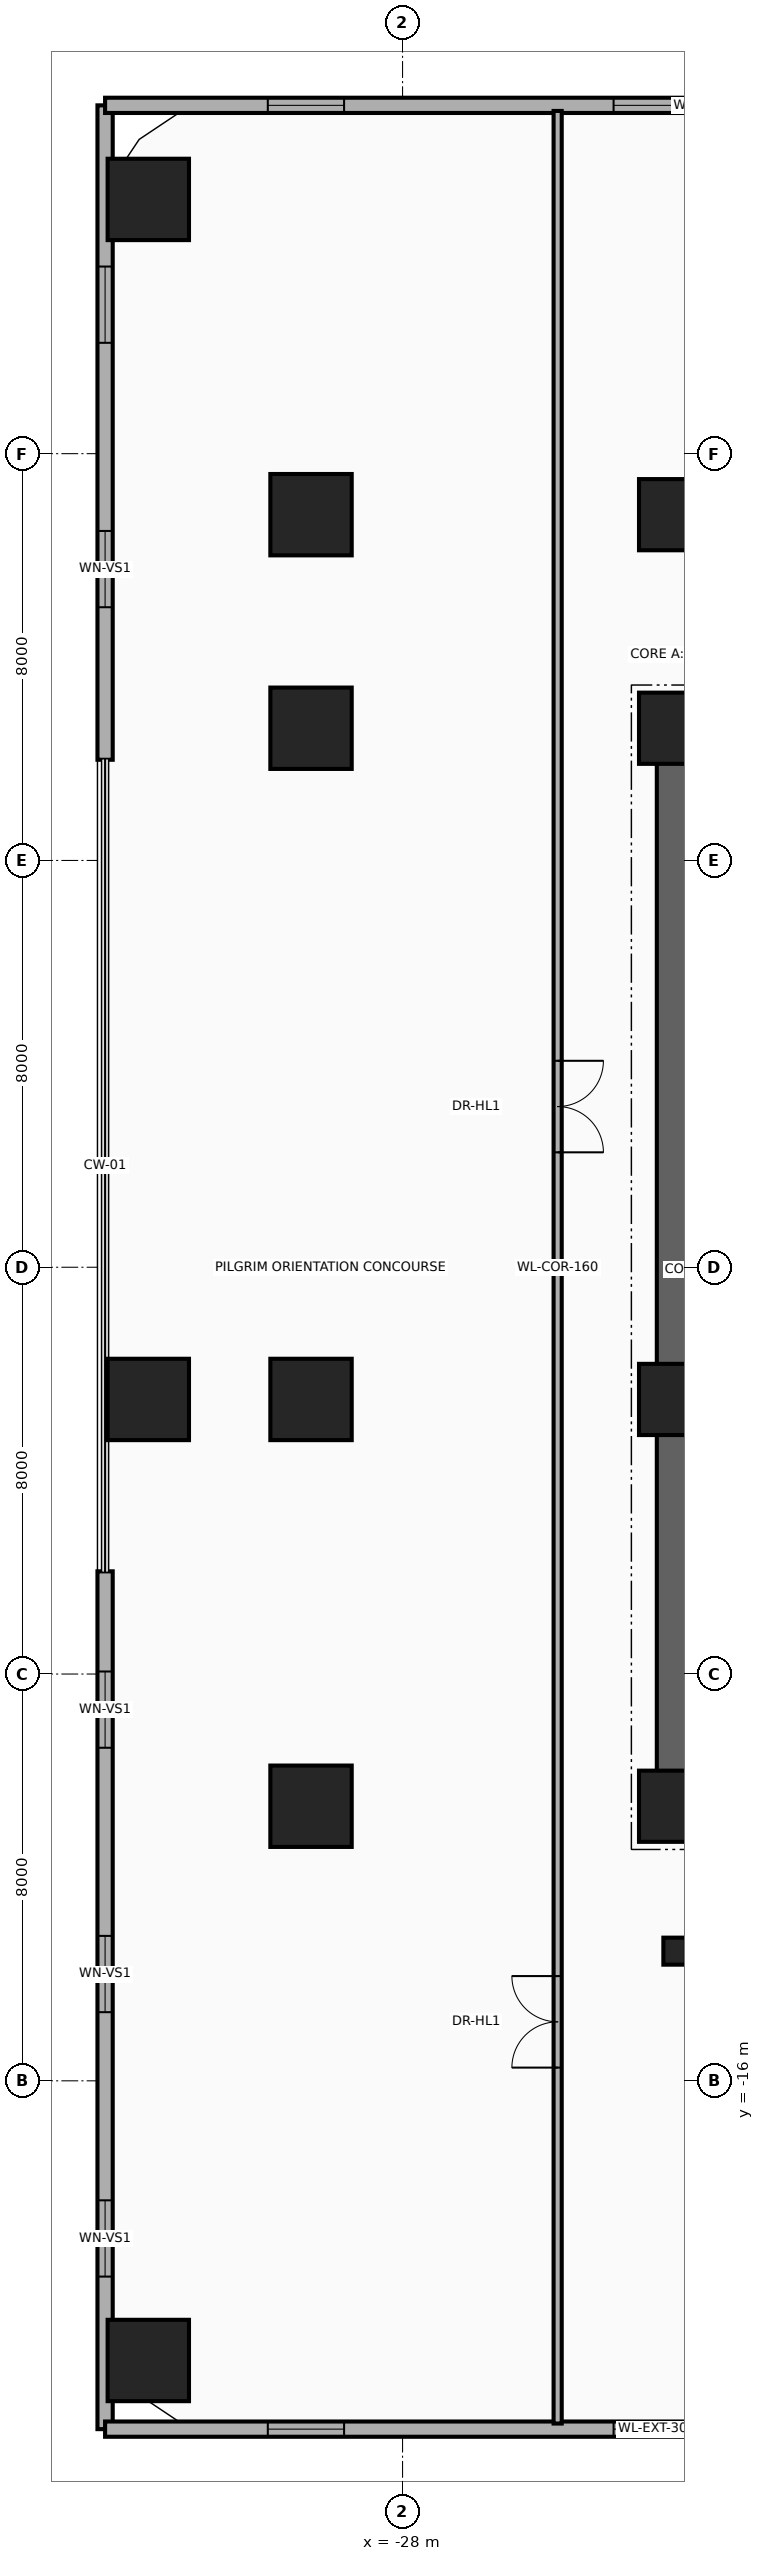
"""IFC4 building model, lengths in metres.
Left out: names, types, materials, properties, quantities, classifications, styles, units other than length and angle.
Written with IfcOpenShell. Run it as: python <this file> out.ifc"""

import sys

from ifc_helpers import new_model, si_unit, direction, frame, frame_2d, origin, origin_2d, place, context, subcontext, project, spatial, rectangle, i_section, extrude, source, transform, mapped, element, fill, save


model = new_model("IFC4")
c1 = context("Model", 3, precision=1e-05, world=origin(), true_north=direction((0.0, 1.0)))
c2 = subcontext(c1, "Body", "Model", "MODEL_VIEW")
j1 = project(units=[si_unit("LENGTHUNIT", "METRE"), si_unit("PLANEANGLEUNIT", "RADIAN")], contexts=[c1])
p1 = place(None, origin())
s1 = spatial("IfcSite", under=j1, at=p1, CompositionType="ELEMENT")
p2 = place(p1, origin())
s2 = spatial("IfcBuilding", under=s1, at=p2, CompositionType="ELEMENT")
p3 = place(p2, frame((0.0, 0.0, 5.2)))
s3 = spatial("IfcBuildingStorey", under=s2, at=p3, CompositionType="ELEMENT", Elevation=5.2)
p4 = place(p3, frame((-22.65, -11.15, 0.0), z_axis=(0.0, 0.0, 1.0), x_axis=(0.0, 1.0, 0.0)))
e1 = element("IfcWall", 1, at=p4, inside=s3, PredefinedType="SHEAR", context=c2, shape_type="SweptSolid", body=[
    extrude(rectangle(XDim=22.3, YDim=0.7, at=frame_2d((11.15, 0.0))), origin(), (0.0, 0.0, 1.0), 4.92),
])
for number, where, z_axis, x_axis in (
    (2, (-22.65, 10.8, 0.0), (0.0, 0.0, 1.0), (1.0, 0.0, 0.0)),
    (3, (-22.65, -10.8, 0.0), (0.0, 0.0, 1.0), (1.0, 0.0, 0.0)),
):
    element("IfcWall", number, at=place(p3, frame(where, z_axis=z_axis, x_axis=x_axis)), inside=s3, PredefinedType="SHEAR", context=c2, shape_type="SweptSolid", body=[
        extrude(rectangle(XDim=10.25, YDim=0.7, at=frame_2d((5.125, 0.0))), origin(), (0.0, 0.0, 1.0), 4.92),
    ])
m1 = source(origin(), c2, "Body", "SweptSolid", [
    extrude(rectangle(XDim=1.6, YDim=1.6, at=origin_2d()), origin(), (0.0, 0.0, 1.0), 5.2),
])
p5 = place(p3, frame((-29.8, -10.6, 0.0), z_axis=(0.0, 0.0, 1.0), x_axis=(1.0, 0.0, 0.0)))
e4 = element("IfcColumn", 4, at=p5, inside=s3, PredefinedType="COLUMN", context=c2, shape_type="MappedRepresentation", body=[
    mapped(m1, transform((0.0, 0.0, 0.0), x_axis=(1.0, 0.0, 0.0), y_axis=(0.0, 1.0, 0.0), z_axis=(0.0, 0.0, 1.0), scale=1.0)),
])
m2 = source(origin(), c2, "Body", "SweptSolid", [
    extrude(rectangle(XDim=1.4, YDim=1.4, at=origin_2d()), origin(), (0.0, 0.0, 1.0), 5.2),
])
p6 = place(p3, frame((-22.65, -10.6, 0.0), z_axis=(0.0, 0.0, 1.0), x_axis=(1.0, 0.0, 0.0)))
e5 = element("IfcColumn", 5, at=p6, inside=s3, PredefinedType="COLUMN", context=c2, shape_type="MappedRepresentation", body=[
    mapped(m2, transform((0.0, 0.0, 0.0), x_axis=(1.0, 0.0, 0.0), y_axis=(0.0, 1.0, 0.0), z_axis=(0.0, 0.0, 1.0), scale=1.0)),
])
p7 = place(p3, frame((-29.8, -2.6, 0.0), z_axis=(0.0, 0.0, 1.0), x_axis=(1.0, 0.0, 0.0)))
e6 = element("IfcColumn", 6, at=p7, inside=s3, PredefinedType="COLUMN", context=c2, shape_type="MappedRepresentation", body=[
    mapped(m1, transform((0.0, 0.0, 0.0), x_axis=(1.0, 0.0, 0.0), y_axis=(0.0, 1.0, 0.0), z_axis=(0.0, 0.0, 1.0), scale=1.0)),
])
p8 = place(p3, frame((-22.65, -2.6, 0.0), z_axis=(0.0, 0.0, 1.0), x_axis=(1.0, 0.0, 0.0)))
e7 = element("IfcColumn", 7, at=p8, inside=s3, PredefinedType="COLUMN", context=c2, shape_type="MappedRepresentation", body=[
    mapped(m2, transform((0.0, 0.0, 0.0), x_axis=(1.0, 0.0, 0.0), y_axis=(0.0, 1.0, 0.0), z_axis=(0.0, 0.0, 1.0), scale=1.0)),
])
p9 = place(p3, frame((-29.8, 10.6, 0.0), z_axis=(0.0, 0.0, 1.0), x_axis=(1.0, 0.0, 0.0)))
e8 = element("IfcColumn", 8, at=p9, inside=s3, PredefinedType="COLUMN", context=c2, shape_type="MappedRepresentation", body=[
    mapped(m1, transform((0.0, 0.0, 0.0), x_axis=(1.0, 0.0, 0.0), y_axis=(0.0, 1.0, 0.0), z_axis=(0.0, 0.0, 1.0), scale=1.0)),
])
p10 = place(p3, frame((-22.65, 10.6, 0.0), z_axis=(0.0, 0.0, 1.0), x_axis=(1.0, 0.0, 0.0)))
e9 = element("IfcColumn", 9, at=p10, inside=s3, PredefinedType="COLUMN", context=c2, shape_type="MappedRepresentation", body=[
    mapped(m2, transform((0.0, 0.0, 0.0), x_axis=(1.0, 0.0, 0.0), y_axis=(0.0, 1.0, 0.0), z_axis=(0.0, 0.0, 1.0), scale=1.0)),
])
p11 = place(p3, frame((-29.8, 14.8, 0.0), z_axis=(0.0, 0.0, 1.0), x_axis=(1.0, 0.0, 0.0)))
e10 = element("IfcColumn", 10, at=p11, inside=s3, PredefinedType="COLUMN", context=c2, shape_type="MappedRepresentation", body=[
    mapped(m1, transform((0.0, 0.0, 0.0), x_axis=(1.0, 0.0, 0.0), y_axis=(0.0, 1.0, 0.0), z_axis=(0.0, 0.0, 1.0), scale=1.0)),
])
p12 = place(p3, frame((-22.65, 14.8, 0.0), z_axis=(0.0, 0.0, 1.0), x_axis=(1.0, 0.0, 0.0)))
e11 = element("IfcColumn", 11, at=p12, inside=s3, PredefinedType="COLUMN", context=c2, shape_type="MappedRepresentation", body=[
    mapped(m2, transform((0.0, 0.0, 0.0), x_axis=(1.0, 0.0, 0.0), y_axis=(0.0, 1.0, 0.0), z_axis=(0.0, 0.0, 1.0), scale=1.0)),
])
m3 = source(origin(), c2, "Body", "SweptSolid", [
    extrude(i_section(OverallWidth=0.442, OverallDepth=0.531, WebThickness=0.066, FlangeThickness=0.106, at=origin_2d()), origin(), (0.0, 0.0, 1.0), 5.2),
])
p13 = place(p3, frame((-22.65, -13.45, 0.0), z_axis=(0.0, 0.0, 1.0), x_axis=(1.0, 0.0, 0.0)))
e12 = element("IfcColumn", 12, at=p13, inside=s3, PredefinedType="COLUMN", context=c2, shape_type="MappedRepresentation", body=[
    mapped(m3, transform((0.0, 0.0, 0.0), x_axis=(1.0, 0.0, 0.0), y_axis=(0.0, 1.0, 0.0), z_axis=(0.0, 0.0, 1.0), scale=1.0)),
])
for number, where, z_axis, x_axis in (
    (13, (-33.0, -21.5, 0.0), (0.0, 0.0, 1.0), (1.0, 0.0, 0.0)),
    (14, (-33.0, -2.6, 0.0), (0.0, 0.0, 1.0), (1.0, 0.0, 0.0)),
    (15, (-33.0, 21.0, 0.0), (0.0, 0.0, 1.0), (1.0, 0.0, 0.0)),
):
    element("IfcColumn", number, at=place(p3, frame(where, z_axis=z_axis, x_axis=x_axis)), inside=s3, PredefinedType="COLUMN", context=c2, shape_type="MappedRepresentation", body=[
        mapped(m1, transform((0.0, 0.0, 0.0), x_axis=(1.0, 0.0, 0.0), y_axis=(0.0, 1.0, 0.0), z_axis=(0.0, 0.0, 1.0), scale=1.0)),
    ])
p14 = place(p3, frame((-33.85, -22.85, 0.0), z_axis=(0.0, 0.0, 1.0), x_axis=(0.0, 1.0, 0.0)))
e16 = element("IfcWall", 16, at=p14, inside=s3, PredefinedType="SOLIDWALL", context=c2, shape_type="SweptSolid", body=[
    extrude(rectangle(XDim=16.87, YDim=0.3, at=frame_2d((8.435, 0.0))), origin(), (0.0, 0.0, 1.0), 4.92),
])
p15 = place(p14, frame((3.0, 0.0, 0.9)))
e17 = element("IfcOpeningElement", 17, at=p15, cuts=e16, PredefinedType="OPENING", context=c2, shape_type="SweptSolid", body=[
    extrude(rectangle(XDim=1.5, YDim=1.75, at=frame_2d((0.75, 0.875))), frame((0.0, 0.165, 0.0), z_axis=(0.0, -1.0, 0.0), x_axis=(1.0, 0.0, 0.0)), (0.0, 0.0, 1.0), 0.33),
])
p16 = place(p14, frame((8.2, 0.0, 0.9)))
e18 = element("IfcOpeningElement", 18, at=p16, cuts=e16, PredefinedType="OPENING", context=c2, shape_type="SweptSolid", body=[
    extrude(rectangle(XDim=1.5, YDim=1.75, at=frame_2d((0.75, 0.875))), frame((0.0, 0.165, 0.0), z_axis=(0.0, -1.0, 0.0), x_axis=(1.0, 0.0, 0.0)), (0.0, 0.0, 1.0), 0.33),
])
p17 = place(p14, frame((13.4, 0.0, 0.9)))
e19 = element("IfcOpeningElement", 19, at=p17, cuts=e16, PredefinedType="OPENING", context=c2, shape_type="SweptSolid", body=[
    extrude(rectangle(XDim=1.5, YDim=1.75, at=frame_2d((0.75, 0.875))), frame((0.0, 0.165, 0.0), z_axis=(0.0, -1.0, 0.0), x_axis=(1.0, 0.0, 0.0)), (0.0, 0.0, 1.0), 0.33),
])
p18 = place(p3, frame((-33.85, 9.98, 0.0), z_axis=(0.0, 0.0, 1.0), x_axis=(0.0, 1.0, 0.0)))
e20 = element("IfcWall", 20, at=p18, inside=s3, PredefinedType="SOLIDWALL", context=c2, shape_type="SweptSolid", body=[
    extrude(rectangle(XDim=12.87, YDim=0.3, at=frame_2d((6.435, 0.0))), origin(), (0.0, 0.0, 1.0), 4.92),
])
p19 = place(p18, frame((3.0, 0.0, 0.9)))
e21 = element("IfcOpeningElement", 21, at=p19, cuts=e20, PredefinedType="OPENING", context=c2, shape_type="SweptSolid", body=[
    extrude(rectangle(XDim=1.5, YDim=1.75, at=frame_2d((0.75, 0.875))), frame((0.0, 0.165, 0.0), z_axis=(0.0, -1.0, 0.0), x_axis=(1.0, 0.0, 0.0)), (0.0, 0.0, 1.0), 0.33),
])
p20 = place(p18, frame((8.2, 0.0, 0.9)))
e22 = element("IfcOpeningElement", 22, at=p20, cuts=e20, PredefinedType="OPENING", context=c2, shape_type="SweptSolid", body=[
    extrude(rectangle(XDim=1.5, YDim=1.75, at=frame_2d((0.75, 0.875))), frame((0.0, 0.165, 0.0), z_axis=(0.0, -1.0, 0.0), x_axis=(1.0, 0.0, 0.0)), (0.0, 0.0, 1.0), 0.33),
])
p21 = place(p3, frame((-33.85, -22.85, 0.0), z_axis=(0.0, 0.0, 1.0), x_axis=(1.0, 0.0, 0.0)))
e23 = element("IfcWall", 23, at=p21, inside=s3, PredefinedType="SOLIDWALL", context=c2, shape_type="SweptSolid", body=[
    extrude(rectangle(XDim=21.7, YDim=0.3, at=frame_2d((10.85, 0.0))), origin(), (0.0, 0.0, 1.0), 4.92),
])
p22 = place(p21, frame((3.2, 0.0, 0.9)))
e24 = element("IfcOpeningElement", 24, at=p22, cuts=e23, PredefinedType="OPENING", context=c2, shape_type="SweptSolid", body=[
    extrude(rectangle(XDim=1.5, YDim=1.75, at=frame_2d((0.75, 0.875))), frame((0.0, 0.165, 0.0), z_axis=(0.0, -1.0, 0.0), x_axis=(1.0, 0.0, 0.0)), (0.0, 0.0, 1.0), 0.33),
])
p23 = place(p21, frame((10.0, 0.0, 0.9)))
e25 = element("IfcOpeningElement", 25, at=p23, cuts=e23, PredefinedType="OPENING", context=c2, shape_type="SweptSolid", body=[
    extrude(rectangle(XDim=1.5, YDim=1.75, at=frame_2d((0.75, 0.875))), frame((0.0, 0.165, 0.0), z_axis=(0.0, -1.0, 0.0), x_axis=(1.0, 0.0, 0.0)), (0.0, 0.0, 1.0), 0.33),
])
p24 = place(p21, frame((17.8, 0.0, 0.9)))
e26 = element("IfcOpeningElement", 26, at=p24, cuts=e23, PredefinedType="OPENING", context=c2, shape_type="SweptSolid", body=[
    extrude(rectangle(XDim=1.5, YDim=1.75, at=frame_2d((0.75, 0.875))), frame((0.0, 0.165, 0.0), z_axis=(0.0, -1.0, 0.0), x_axis=(1.0, 0.0, 0.0)), (0.0, 0.0, 1.0), 0.33),
])
p25 = place(p3, frame((-33.85, 22.85, 0.0), z_axis=(0.0, 0.0, 1.0), x_axis=(1.0, 0.0, 0.0)))
e27 = element("IfcWall", 27, at=p25, inside=s3, PredefinedType="SOLIDWALL", context=c2, shape_type="SweptSolid", body=[
    extrude(rectangle(XDim=23.87, YDim=0.3, at=frame_2d((11.935, 0.0))), origin(), (0.0, 0.0, 1.0), 4.92),
])
p26 = place(p25, frame((3.2, 0.0, 0.9)))
e28 = element("IfcOpeningElement", 28, at=p26, cuts=e27, PredefinedType="OPENING", context=c2, shape_type="SweptSolid", body=[
    extrude(rectangle(XDim=1.5, YDim=1.75, at=frame_2d((0.75, 0.875))), frame((0.0, 0.165, 0.0), z_axis=(0.0, -1.0, 0.0), x_axis=(1.0, 0.0, 0.0)), (0.0, 0.0, 1.0), 0.33),
])
p27 = place(p25, frame((10.0, 0.0, 0.9)))
e29 = element("IfcOpeningElement", 29, at=p27, cuts=e27, PredefinedType="OPENING", context=c2, shape_type="SweptSolid", body=[
    extrude(rectangle(XDim=1.5, YDim=1.75, at=frame_2d((0.75, 0.875))), frame((0.0, 0.165, 0.0), z_axis=(0.0, -1.0, 0.0), x_axis=(1.0, 0.0, 0.0)), (0.0, 0.0, 1.0), 0.33),
])
p28 = place(p25, frame((17.8, 0.0, 0.9)))
e30 = element("IfcOpeningElement", 30, at=p28, cuts=e27, PredefinedType="OPENING", context=c2, shape_type="SweptSolid", body=[
    extrude(rectangle(XDim=1.5, YDim=1.75, at=frame_2d((0.75, 0.875))), frame((0.0, 0.165, 0.0), z_axis=(0.0, -1.0, 0.0), x_axis=(1.0, 0.0, 0.0)), (0.0, 0.0, 1.0), 0.33),
])
p29 = place(p3, frame((-24.95, -22.74, 0.0), z_axis=(0.0, 0.0, 1.0), x_axis=(0.0, 1.0, 0.0)))
e31 = element("IfcWall", 31, at=p29, inside=s3, PredefinedType="PARTITIONING", context=c2, shape_type="SweptSolid", body=[
    extrude(rectangle(XDim=45.48, YDim=0.16, at=frame_2d((22.74, 0.0))), origin(), (0.0, 0.0, 1.0), 3.957),
])
p30 = place(p29, frame((7.0, 0.0, 0.0)))
e32 = element("IfcOpeningElement", 32, at=p30, cuts=e31, PredefinedType="OPENING", context=c2, shape_type="SweptSolid", body=[
    extrude(rectangle(XDim=1.8, YDim=2.15, at=frame_2d((0.9, 1.075))), frame((0.0, 0.095, 0.0), z_axis=(0.0, -1.0, 0.0), x_axis=(1.0, 0.0, 0.0)), (0.0, 0.0, 1.0), 0.19),
])
p31 = place(p29, frame((25.0, 0.0, 0.0)))
e33 = element("IfcOpeningElement", 33, at=p31, cuts=e31, PredefinedType="OPENING", context=c2, shape_type="SweptSolid", body=[
    extrude(rectangle(XDim=1.8, YDim=2.15, at=frame_2d((0.9, 1.075))), frame((0.0, 0.095, 0.0), z_axis=(0.0, -1.0, 0.0), x_axis=(1.0, 0.0, 0.0)), (0.0, 0.0, 1.0), 0.19),
])
p32 = place(p15, origin())
e34 = element("IfcWindow", 34, at=p32, inside=s3, PartitioningType="SINGLE_PANEL", PredefinedType="WINDOW", context=c2, shape_type="SweptSolid", body=[
    extrude(rectangle(XDim=1.5, YDim=1.75, at=frame_2d((0.75, 0.875))), frame((0.0, 0.03, 0.0), z_axis=(0.0, -1.0, 0.0), x_axis=(1.0, 0.0, 0.0)), (0.0, 0.0, 1.0), 0.06),
])
fill(e17, e34)
p33 = place(p16, origin())
e35 = element("IfcWindow", 35, at=p33, inside=s3, PartitioningType="SINGLE_PANEL", PredefinedType="WINDOW", context=c2, shape_type="SweptSolid", body=[
    extrude(rectangle(XDim=1.5, YDim=1.75, at=frame_2d((0.75, 0.875))), frame((0.0, 0.03, 0.0), z_axis=(0.0, -1.0, 0.0), x_axis=(1.0, 0.0, 0.0)), (0.0, 0.0, 1.0), 0.06),
])
fill(e18, e35)
p34 = place(p17, origin())
e36 = element("IfcWindow", 36, at=p34, inside=s3, PartitioningType="SINGLE_PANEL", PredefinedType="WINDOW", context=c2, shape_type="SweptSolid", body=[
    extrude(rectangle(XDim=1.5, YDim=1.75, at=frame_2d((0.75, 0.875))), frame((0.0, 0.03, 0.0), z_axis=(0.0, -1.0, 0.0), x_axis=(1.0, 0.0, 0.0)), (0.0, 0.0, 1.0), 0.06),
])
fill(e19, e36)
p35 = place(p19, origin())
e37 = element("IfcWindow", 37, at=p35, inside=s3, PartitioningType="SINGLE_PANEL", PredefinedType="WINDOW", context=c2, shape_type="SweptSolid", body=[
    extrude(rectangle(XDim=1.5, YDim=1.75, at=frame_2d((0.75, 0.875))), frame((0.0, 0.03, 0.0), z_axis=(0.0, -1.0, 0.0), x_axis=(1.0, 0.0, 0.0)), (0.0, 0.0, 1.0), 0.06),
])
fill(e21, e37)
p36 = place(p20, origin())
e38 = element("IfcWindow", 38, at=p36, inside=s3, PartitioningType="SINGLE_PANEL", PredefinedType="WINDOW", context=c2, shape_type="SweptSolid", body=[
    extrude(rectangle(XDim=1.5, YDim=1.75, at=frame_2d((0.75, 0.875))), frame((0.0, 0.03, 0.0), z_axis=(0.0, -1.0, 0.0), x_axis=(1.0, 0.0, 0.0)), (0.0, 0.0, 1.0), 0.06),
])
fill(e22, e38)
p37 = place(p22, origin())
e39 = element("IfcWindow", 39, at=p37, inside=s3, PartitioningType="SINGLE_PANEL", PredefinedType="WINDOW", context=c2, shape_type="SweptSolid", body=[
    extrude(rectangle(XDim=1.5, YDim=1.75, at=frame_2d((0.75, 0.875))), frame((0.0, 0.03, 0.0), z_axis=(0.0, -1.0, 0.0), x_axis=(1.0, 0.0, 0.0)), (0.0, 0.0, 1.0), 0.06),
])
fill(e24, e39)
p38 = place(p23, origin())
e40 = element("IfcWindow", 40, at=p38, inside=s3, PartitioningType="SINGLE_PANEL", PredefinedType="WINDOW", context=c2, shape_type="SweptSolid", body=[
    extrude(rectangle(XDim=1.5, YDim=1.75, at=frame_2d((0.75, 0.875))), frame((0.0, 0.03, 0.0), z_axis=(0.0, -1.0, 0.0), x_axis=(1.0, 0.0, 0.0)), (0.0, 0.0, 1.0), 0.06),
])
fill(e25, e40)
p39 = place(p26, origin())
e41 = element("IfcWindow", 41, at=p39, inside=s3, PartitioningType="SINGLE_PANEL", PredefinedType="WINDOW", context=c2, shape_type="SweptSolid", body=[
    extrude(rectangle(XDim=1.5, YDim=1.75, at=frame_2d((0.75, 0.875))), frame((0.0, 0.03, 0.0), z_axis=(0.0, -1.0, 0.0), x_axis=(1.0, 0.0, 0.0)), (0.0, 0.0, 1.0), 0.06),
])
fill(e28, e41)
p40 = place(p27, origin())
e42 = element("IfcWindow", 42, at=p40, inside=s3, PartitioningType="SINGLE_PANEL", PredefinedType="WINDOW", context=c2, shape_type="SweptSolid", body=[
    extrude(rectangle(XDim=1.5, YDim=1.75, at=frame_2d((0.75, 0.875))), frame((0.0, 0.03, 0.0), z_axis=(0.0, -1.0, 0.0), x_axis=(1.0, 0.0, 0.0)), (0.0, 0.0, 1.0), 0.06),
])
fill(e29, e42)
p41 = place(p30, origin())
e43 = element("IfcDoor", 43, at=p41, inside=s3, OperationType="DOUBLE_DOOR_SINGLE_SWING", PredefinedType="DOOR", context=c2, shape_type="SweptSolid", body=[
    extrude(rectangle(XDim=1.8, YDim=2.15, at=frame_2d((0.9, 1.075))), frame((0.0, 0.025, 0.0), z_axis=(0.0, -1.0, 0.0), x_axis=(1.0, 0.0, 0.0)), (0.0, 0.0, 1.0), 0.05),
])
fill(e32, e43)
p42 = place(p31, frame((1.8, 0.0, 0.0), z_axis=(0.0, 0.0, 1.0), x_axis=(-1.0, 0.0, 0.0)))
e44 = element("IfcDoor", 44, at=p42, inside=s3, OperationType="DOUBLE_DOOR_SINGLE_SWING", PredefinedType="DOOR", context=c2, shape_type="SweptSolid", body=[
    extrude(rectangle(XDim=1.8, YDim=2.15, at=frame_2d((0.9, 1.075))), frame((0.0, 0.025, 0.0), z_axis=(0.0, -1.0, 0.0), x_axis=(1.0, 0.0, 0.0)), (0.0, 0.0, 1.0), 0.05),
])
fill(e33, e44)
save(model, sys.argv[1])
